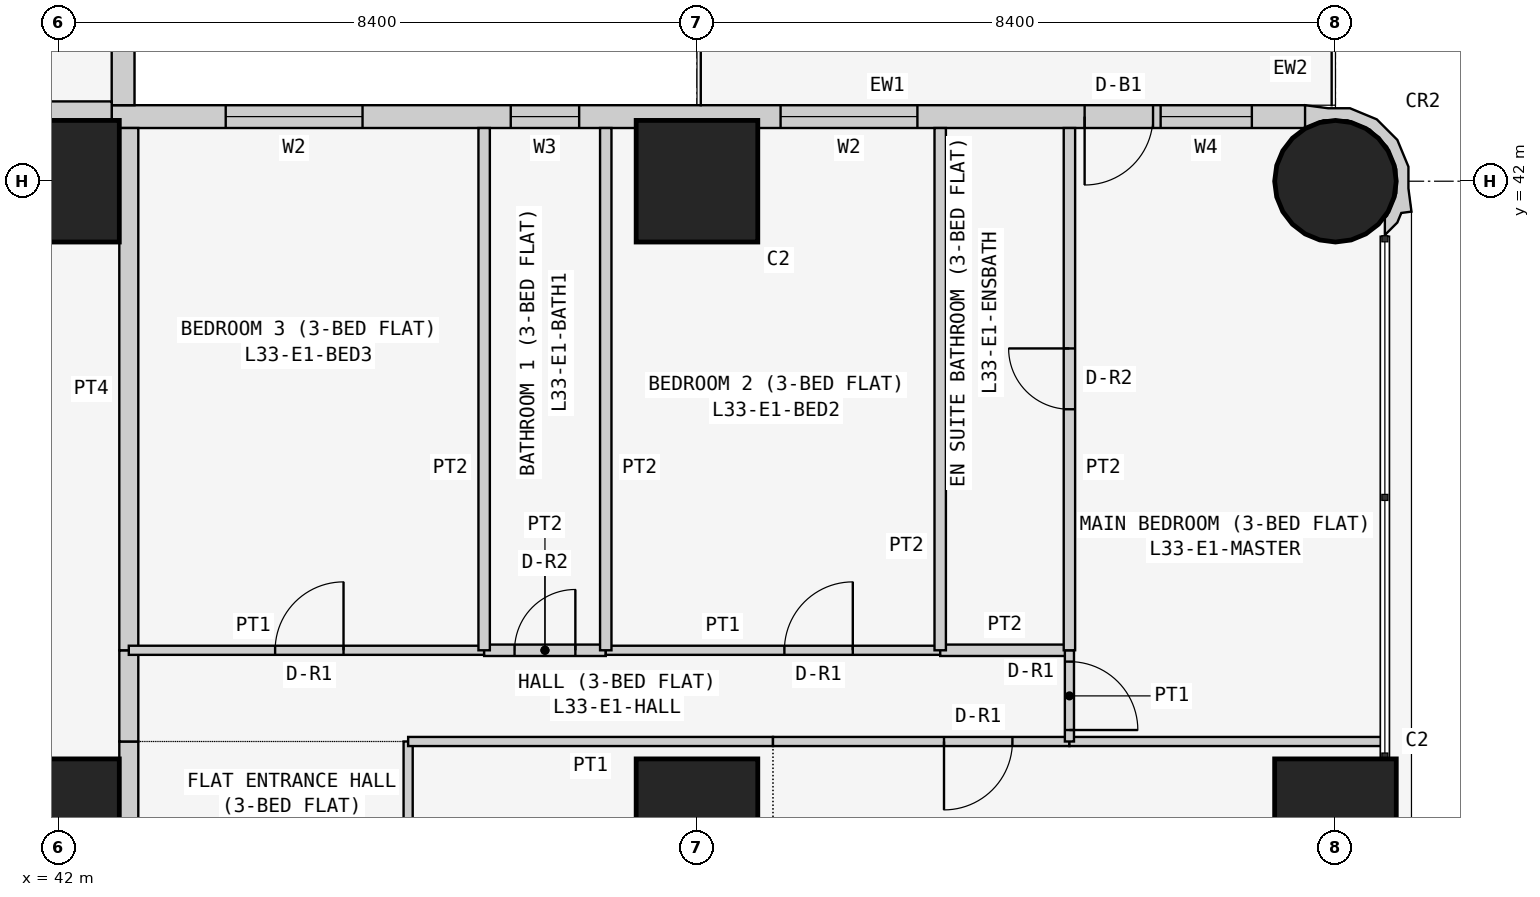
"""IFC4 building model, lengths in metres.
Left out: names, types, materials, properties, quantities, classifications, styles, units other than length and angle.
Written with IfcOpenShell. Run it as: python <this file> out.ifc"""

import sys

from ifc_helpers import new_model, si_unit, direction, frame, frame_2d, origin, origin_2d, place, context, subcontext, project, spatial, polyline, rectangle, circle, outline, extrude, element, fill, save


model = new_model("IFC4")
c1 = context("Model", 3, precision=1e-05, world=origin(), true_north=direction((0.0, 1.0)))
c2 = subcontext(c1, "Body", "Model", "MODEL_VIEW")
j1 = project(units=[si_unit("LENGTHUNIT", "METRE"), si_unit("PLANEANGLEUNIT", "RADIAN")], contexts=[c1])
p1 = place(None, origin())
s1 = spatial("IfcSite", under=j1, at=p1, CompositionType="ELEMENT")
p2 = place(p1, origin())
s2 = spatial("IfcBuilding", under=s1, at=p2, CompositionType="ELEMENT")
p3 = place(p2, frame((0.0, 0.0, 130.5)))
s3 = spatial("IfcBuildingStorey", under=s2, at=p3, CompositionType="ELEMENT", Elevation=130.5)
for number, where, z_axis, x_axis in (
    (1, (42.0, 33.6, 0.0), (0.0, 0.0, 1.0), (1.0, 0.0, 0.0)),
    (2, (42.0, 42.0, 0.0), (0.0, 0.0, 1.0), (1.0, 0.0, 0.0)),
    (3, (50.4, 33.6, 0.0), (0.0, 0.0, 1.0), (1.0, 0.0, 0.0)),
    (4, (50.4, 42.0, 0.0), (0.0, 0.0, 1.0), (1.0, 0.0, 0.0)),
    (5, (58.8, 33.6, 0.0), (0.0, 0.0, 1.0), (1.0, 0.0, 0.0)),
):
    element("IfcColumn", number, at=place(p3, frame(where, z_axis=z_axis, x_axis=x_axis)), inside=s3, PredefinedType="COLUMN", context=c2, shape_type="SweptSolid", body=[
        extrude(rectangle(XDim=1.6, YDim=1.6, at=origin_2d()), origin(), (0.0, 0.0, 1.0), 3.6),
    ])
p4 = place(p3, frame((58.8, 42.0, 0.0), z_axis=(0.0, 0.0, 1.0), x_axis=(1.0, 0.0, 0.0)))
e6 = element("IfcColumn", 6, at=p4, inside=s3, PredefinedType="COLUMN", context=c2, shape_type="SweptSolid", body=[
    extrude(circle(Radius=0.8, at=origin_2d()), origin(), (0.0, 0.0, 1.0), 3.6),
])
p5 = place(p3, frame((58.4, 42.85, 0.0), z_axis=(0.0, 0.0, 1.0), x_axis=(-1.0, 0.0, 0.0)))
e7 = element("IfcWall", 7, at=p5, inside=s3, PredefinedType="SOLIDWALL", context=c2, shape_type="SweptSolid", body=[
    extrude(rectangle(XDim=15.7, YDim=0.3, at=frame_2d((7.85, 0.0))), origin(), (0.0, 0.0, 1.0), 3.45),
])
p6 = place(p5, frame((12.4, 0.0, 0.9)))
e8 = element("IfcOpeningElement", 8, at=p6, cuts=e7, PredefinedType="OPENING", context=c2, shape_type="SweptSolid", body=[
    extrude(rectangle(XDim=1.8, YDim=1.5, at=frame_2d((0.9, 0.75))), frame((0.0, 0.16, 0.0), z_axis=(0.0, -1.0, 0.0), x_axis=(1.0, 0.0, 0.0)), (0.0, 0.0, 1.0), 0.32),
])
p7 = place(p5, frame((9.55, 0.0, 1.5)))
e9 = element("IfcOpeningElement", 9, at=p7, cuts=e7, PredefinedType="OPENING", context=c2, shape_type="SweptSolid", body=[
    extrude(rectangle(XDim=0.9, YDim=0.7, at=frame_2d((0.45, 0.35))), frame((0.0, 0.16, 0.0), z_axis=(0.0, -1.0, 0.0), x_axis=(1.0, 0.0, 0.0)), (0.0, 0.0, 1.0), 0.32),
])
p8 = place(p5, frame((5.1, 0.0, 0.9)))
e10 = element("IfcOpeningElement", 10, at=p8, cuts=e7, PredefinedType="OPENING", context=c2, shape_type="SweptSolid", body=[
    extrude(rectangle(XDim=1.8, YDim=1.5, at=frame_2d((0.9, 0.75))), frame((0.0, 0.16, 0.0), z_axis=(0.0, -1.0, 0.0), x_axis=(1.0, 0.0, 0.0)), (0.0, 0.0, 1.0), 0.32),
])
p9 = place(p5, frame((2.0, 0.0, 0.0)))
e11 = element("IfcOpeningElement", 11, at=p9, cuts=e7, PredefinedType="OPENING", context=c2, shape_type="SweptSolid", body=[
    extrude(rectangle(XDim=0.9, YDim=2.4, at=frame_2d((0.45, 1.2))), frame((0.0, 0.16, 0.0), z_axis=(0.0, -1.0, 0.0), x_axis=(1.0, 0.0, 0.0)), (0.0, 0.0, 1.0), 0.32),
])
p10 = place(p5, frame((0.7, 0.0, 0.9)))
e12 = element("IfcOpeningElement", 12, at=p10, cuts=e7, PredefinedType="OPENING", context=c2, shape_type="SweptSolid", body=[
    extrude(rectangle(XDim=1.2, YDim=1.5, at=frame_2d((0.6, 0.75))), frame((0.0, 0.16, 0.0), z_axis=(0.0, -1.0, 0.0), x_axis=(1.0, 0.0, 0.0)), (0.0, 0.0, 1.0), 0.32),
])
p11 = place(p3, frame((42.85, 43.0, 0.0), z_axis=(0.0, 0.0, 1.0), x_axis=(0.0, 1.0, 0.0)))
e13 = element("IfcWall", 13, at=p11, inside=s3, PredefinedType="SOLIDWALL", context=c2, shape_type="SweptSolid", body=[
    extrude(rectangle(XDim=7.0, YDim=0.3, at=frame_2d((3.5, 0.0))), origin(), (0.0, 0.0, 1.0), 3.45),
])
p12 = place(p11, frame((1.5, 0.0, 0.9)))
e14 = element("IfcOpeningElement", 14, at=p12, cuts=e13, PredefinedType="OPENING", context=c2, shape_type="SweptSolid", body=[
    extrude(rectangle(XDim=2.4, YDim=1.5, at=frame_2d((1.2, 0.75))), frame((0.0, 0.16, 0.0), z_axis=(0.0, -1.0, 0.0), x_axis=(1.0, 0.0, 0.0)), (0.0, 0.0, 1.0), 0.32),
])
p13 = place(p11, frame((5.05, 0.0, 0.9)))
e15 = element("IfcOpeningElement", 15, at=p13, cuts=e13, PredefinedType="OPENING", context=c2, shape_type="SweptSolid", body=[
    extrude(rectangle(XDim=1.2, YDim=1.5, at=frame_2d((0.6, 0.75))), frame((0.0, 0.16, 0.0), z_axis=(0.0, -1.0, 0.0), x_axis=(1.0, 0.0, 0.0)), (0.0, 0.0, 1.0), 0.32),
])
p14 = place(p3, frame((59.395, 41.352, 0.0), z_axis=(0.0, 0.0, 1.0), x_axis=(0.93923434088, 0.343276641956, 0.0)))
e16 = element("IfcWall", 16, at=p14, inside=s3, PredefinedType="SOLIDWALL", context=c2, shape_type="SweptSolid", body=[
    extrude(outline(polyline([(0.532, 0.393), (0.631, 0.663), (0.614, 1.044), (0.453, 1.391), (0.172, 1.649), (-0.097, 1.748), (-0.369, 1.89), (-0.509, 1.621), (-0.491, 1.615), (-0.479, 1.609), (-0.211, 1.62), (0.088, 1.511), (0.323, 1.295), (0.457, 1.006), (0.47, 0.688), (0.361, 0.389), (0.145, 0.154), (0.108, 0.136), (0.031, -0.075), (0.241, 0.023), (0.333, 0.124), (0.465, 0.094), (0.532, 0.393)])), origin(), (0.0, 0.0, 1.0), 3.45),
])
p15 = place(p3, frame((35.829, 42.925, 0.0), z_axis=(0.0, 0.0, 1.0), x_axis=(1.0, 0.0, 0.0)))
e17 = element("IfcWall", 17, at=p15, inside=s3, PredefinedType="PARTITIONING", context=c2, shape_type="SweptSolid", body=[
    extrude(rectangle(XDim=6.871, YDim=0.25, at=frame_2d((3.436, 0.0))), origin(), (0.0, 0.0, 1.0), 3.45),
])
p16 = place(p3, frame((42.925, 34.629, 0.0), z_axis=(0.0, 0.0, 1.0), x_axis=(0.0, -1.0, 0.0)))
e18 = element("IfcWall", 18, at=p16, inside=s3, PredefinedType="PARTITIONING", context=c2, shape_type="SweptSolid", body=[
    extrude(rectangle(XDim=5.229, YDim=0.25, at=frame_2d((2.615, 0.0))), origin(), (0.0, 0.0, 1.0), 3.45),
])
p17 = place(p16, frame((2.129, 0.0, 0.0)))
e19 = element("IfcOpeningElement", 19, at=p17, cuts=e18, PredefinedType="OPENING", context=c2, shape_type="SweptSolid", body=[
    extrude(rectangle(XDim=1.0, YDim=2.1, at=frame_2d((0.5, 1.05))), frame((0.0, 0.135, 0.0), z_axis=(0.0, -1.0, 0.0), x_axis=(1.0, 0.0, 0.0)), (0.0, 0.0, 1.0), 0.27),
])
p18 = place(p3, frame((42.925, 35.829, 0.0), z_axis=(0.0, 0.0, 1.0), x_axis=(0.0, -1.0, 0.0)))
e20 = element("IfcWall", 20, at=p18, inside=s3, PredefinedType="PARTITIONING", context=c2, shape_type="SweptSolid", body=[
    extrude(rectangle(XDim=1.2, YDim=0.25, at=frame_2d((0.6, 0.0))), origin(), (0.0, 0.0, 1.0), 3.45),
])
p19 = place(p3, frame((42.925, 42.7, 0.0), z_axis=(0.0, 0.0, 1.0), x_axis=(0.0, -1.0, 0.0)))
e21 = element("IfcWall", 21, at=p19, inside=s3, PredefinedType="PARTITIONING", context=c2, shape_type="SweptSolid", body=[
    extrude(rectangle(XDim=6.871, YDim=0.25, at=frame_2d((3.436, 0.0))), origin(), (0.0, 0.0, 1.0), 3.45),
])
p20 = place(p3, frame((46.6, 29.4, 0.0), z_axis=(0.0, 0.0, 1.0), x_axis=(0.0, 1.0, 0.0)))
e22 = element("IfcWall", 22, at=p20, inside=s3, PredefinedType="PARTITIONING", context=c2, shape_type="SweptSolid", body=[
    extrude(rectangle(XDim=5.229, YDim=0.12, at=frame_2d((2.615, 0.0))), origin(), (0.0, 0.0, 1.0), 3.45),
])
p21 = place(p20, frame((1.05, 0.0, 0.0)))
e23 = element("IfcOpeningElement", 23, at=p21, cuts=e22, PredefinedType="OPENING", context=c2, shape_type="SweptSolid", body=[
    extrude(rectangle(XDim=0.9, YDim=2.1, at=frame_2d((0.45, 1.05))), frame((0.0, 0.07, 0.0), z_axis=(0.0, -1.0, 0.0), x_axis=(1.0, 0.0, 0.0)), (0.0, 0.0, 1.0), 0.14),
])
p22 = place(p3, frame((51.4, 34.629, 0.0), z_axis=(0.0, 0.0, 1.0), x_axis=(-1.0, 0.0, 0.0)))
e24 = element("IfcWall", 24, at=p22, inside=s3, PredefinedType="PARTITIONING", context=c2, shape_type="SweptSolid", body=[
    extrude(rectangle(XDim=4.8, YDim=0.12, at=frame_2d((2.4, 0.0))), origin(), (0.0, 0.0, 1.0), 3.45),
])
p23 = place(p3, frame((55.3, 34.629, 0.0), z_axis=(0.0, 0.0, 1.0), x_axis=(-1.0, 0.0, 0.0)))
e25 = element("IfcWall", 25, at=p23, inside=s3, PredefinedType="PARTITIONING", context=c2, shape_type="SweptSolid", body=[
    extrude(rectangle(XDim=3.9, YDim=0.12, at=frame_2d((1.95, 0.0))), origin(), (0.0, 0.0, 1.0), 3.45),
])
p24 = place(p23, frame((0.75, 0.0, 0.0)))
e26 = element("IfcOpeningElement", 26, at=p24, cuts=e25, PredefinedType="OPENING", context=c2, shape_type="SweptSolid", body=[
    extrude(rectangle(XDim=0.9, YDim=2.1, at=frame_2d((0.45, 1.05))), frame((0.0, 0.07, 0.0), z_axis=(0.0, -1.0, 0.0), x_axis=(1.0, 0.0, 0.0)), (0.0, 0.0, 1.0), 0.14),
])
p25 = place(p3, frame((59.45, 34.629, 0.0), z_axis=(0.0, 0.0, 1.0), x_axis=(-1.0, 0.0, 0.0)))
e27 = element("IfcWall", 27, at=p25, inside=s3, PredefinedType="PARTITIONING", context=c2, shape_type="SweptSolid", body=[
    extrude(rectangle(XDim=4.15, YDim=0.12, at=frame_2d((2.075, 0.0))), origin(), (0.0, 0.0, 1.0), 3.45),
])
p26 = place(p3, frame((47.6, 35.829, 0.0), z_axis=(0.0, 0.0, 1.0), x_axis=(-1.0, 0.0, 0.0)))
e28 = element("IfcWall", 28, at=p26, inside=s3, PredefinedType="PARTITIONING", context=c2, shape_type="SweptSolid", body=[
    extrude(rectangle(XDim=4.675, YDim=0.12, at=frame_2d((2.337, 0.0))), origin(), (0.0, 0.0, 1.0), 3.45),
])
p27 = place(p26, frame((1.85, 0.0, 0.0)))
e29 = element("IfcOpeningElement", 29, at=p27, cuts=e28, PredefinedType="OPENING", context=c2, shape_type="SweptSolid", body=[
    extrude(rectangle(XDim=0.9, YDim=2.1, at=frame_2d((0.45, 1.05))), frame((0.0, 0.07, 0.0), z_axis=(0.0, -1.0, 0.0), x_axis=(1.0, 0.0, 0.0)), (0.0, 0.0, 1.0), 0.14),
])
p28 = place(p3, frame((49.2, 35.829, 0.0), z_axis=(0.0, 0.0, 1.0), x_axis=(-1.0, 0.0, 0.0)))
e30 = element("IfcWall", 30, at=p28, inside=s3, PredefinedType="PARTITIONING", context=c2, shape_type="SweptSolid", body=[
    extrude(rectangle(XDim=1.6, YDim=0.15, at=frame_2d((0.8, 0.0))), origin(), (0.0, 0.0, 1.0), 3.45),
])
p29 = place(p28, frame((0.4, 0.0, 0.0)))
e31 = element("IfcOpeningElement", 31, at=p29, cuts=e30, PredefinedType="OPENING", context=c2, shape_type="SweptSolid", body=[
    extrude(rectangle(XDim=0.8, YDim=2.1, at=frame_2d((0.4, 1.05))), frame((0.0, 0.085, 0.0), z_axis=(0.0, -1.0, 0.0), x_axis=(1.0, 0.0, 0.0)), (0.0, 0.0, 1.0), 0.17),
])
p30 = place(p3, frame((53.6, 35.829, 0.0), z_axis=(0.0, 0.0, 1.0), x_axis=(-1.0, 0.0, 0.0)))
e32 = element("IfcWall", 32, at=p30, inside=s3, PredefinedType="PARTITIONING", context=c2, shape_type="SweptSolid", body=[
    extrude(rectangle(XDim=4.4, YDim=0.12, at=frame_2d((2.2, 0.0))), origin(), (0.0, 0.0, 1.0), 3.45),
])
p31 = place(p30, frame((1.15, 0.0, 0.0)))
e33 = element("IfcOpeningElement", 33, at=p31, cuts=e32, PredefinedType="OPENING", context=c2, shape_type="SweptSolid", body=[
    extrude(rectangle(XDim=0.9, YDim=2.1, at=frame_2d((0.45, 1.05))), frame((0.0, 0.07, 0.0), z_axis=(0.0, -1.0, 0.0), x_axis=(1.0, 0.0, 0.0)), (0.0, 0.0, 1.0), 0.14),
])
p32 = place(p3, frame((55.3, 35.829, 0.0), z_axis=(0.0, 0.0, 1.0), x_axis=(-1.0, 0.0, 0.0)))
e34 = element("IfcWall", 34, at=p32, inside=s3, PredefinedType="PARTITIONING", context=c2, shape_type="SweptSolid", body=[
    extrude(rectangle(XDim=1.7, YDim=0.15, at=frame_2d((0.85, 0.0))), origin(), (0.0, 0.0, 1.0), 3.45),
])
p33 = place(p3, frame((55.3, 34.629, 0.0), z_axis=(0.0, 0.0, 1.0), x_axis=(0.0, 1.0, 0.0)))
e35 = element("IfcWall", 35, at=p33, inside=s3, PredefinedType="PARTITIONING", context=c2, shape_type="SweptSolid", body=[
    extrude(rectangle(XDim=1.2, YDim=0.12, at=frame_2d((0.6, 0.0))), origin(), (0.0, 0.0, 1.0), 3.45),
])
p34 = place(p33, frame((0.151, 0.0, 0.0)))
e36 = element("IfcOpeningElement", 36, at=p34, cuts=e35, PredefinedType="OPENING", context=c2, shape_type="SweptSolid", body=[
    extrude(rectangle(XDim=0.9, YDim=2.1, at=frame_2d((0.45, 1.05))), frame((0.0, 0.07, 0.0), z_axis=(0.0, -1.0, 0.0), x_axis=(1.0, 0.0, 0.0)), (0.0, 0.0, 1.0), 0.14),
])
for number, where, z_axis, x_axis in (
    (37, (47.6, 35.829, 0.0), (0.0, 0.0, 1.0), (0.0, 1.0, 0.0)),
    (38, (49.2, 35.829, 0.0), (0.0, 0.0, 1.0), (0.0, 1.0, 0.0)),
    (39, (53.6, 35.829, 0.0), (0.0, 0.0, 1.0), (0.0, 1.0, 0.0)),
):
    element("IfcWall", number, at=place(p3, frame(where, z_axis=z_axis, x_axis=x_axis)), inside=s3, PredefinedType="PARTITIONING", context=c2, shape_type="SweptSolid", body=[
        extrude(rectangle(XDim=6.871, YDim=0.15, at=frame_2d((3.436, 0.0))), origin(), (0.0, 0.0, 1.0), 3.45),
    ])
p35 = place(p3, frame((55.3, 35.829, 0.0), z_axis=(0.0, 0.0, 1.0), x_axis=(0.0, 1.0, 0.0)))
e40 = element("IfcWall", 40, at=p35, inside=s3, PredefinedType="PARTITIONING", context=c2, shape_type="SweptSolid", body=[
    extrude(rectangle(XDim=6.871, YDim=0.15, at=frame_2d((3.436, 0.0))), origin(), (0.0, 0.0, 1.0), 3.45),
])
p36 = place(p35, frame((3.171, 0.0, 0.0)))
e41 = element("IfcOpeningElement", 41, at=p36, cuts=e40, PredefinedType="OPENING", context=c2, shape_type="SweptSolid", body=[
    extrude(rectangle(XDim=0.8, YDim=2.1, at=frame_2d((0.4, 1.05))), frame((0.0, 0.085, 0.0), z_axis=(0.0, -1.0, 0.0), x_axis=(1.0, 0.0, 0.0)), (0.0, 0.0, 1.0), 0.17),
])
p37 = place(p6, origin())
e42 = element("IfcWindow", 42, at=p37, inside=s3, PartitioningType="SINGLE_PANEL", PredefinedType="WINDOW", context=c2, shape_type="SweptSolid", body=[
    extrude(rectangle(XDim=1.8, YDim=1.5, at=frame_2d((0.9, 0.75))), frame((0.0, 0.03, 0.0), z_axis=(0.0, -1.0, 0.0), x_axis=(1.0, 0.0, 0.0)), (0.0, 0.0, 1.0), 0.06),
])
fill(e8, e42)
p38 = place(p7, origin())
e43 = element("IfcWindow", 43, at=p38, inside=s3, PartitioningType="SINGLE_PANEL", PredefinedType="WINDOW", context=c2, shape_type="SweptSolid", body=[
    extrude(rectangle(XDim=0.9, YDim=0.7, at=frame_2d((0.45, 0.35))), frame((0.0, 0.03, 0.0), z_axis=(0.0, -1.0, 0.0), x_axis=(1.0, 0.0, 0.0)), (0.0, 0.0, 1.0), 0.06),
])
fill(e9, e43)
p39 = place(p8, origin())
e44 = element("IfcWindow", 44, at=p39, inside=s3, PartitioningType="SINGLE_PANEL", PredefinedType="WINDOW", context=c2, shape_type="SweptSolid", body=[
    extrude(rectangle(XDim=1.8, YDim=1.5, at=frame_2d((0.9, 0.75))), frame((0.0, 0.03, 0.0), z_axis=(0.0, -1.0, 0.0), x_axis=(1.0, 0.0, 0.0)), (0.0, 0.0, 1.0), 0.06),
])
fill(e10, e44)
p40 = place(p9, origin())
e45 = element("IfcDoor", 45, at=p40, inside=s3, OperationType="SINGLE_SWING_RIGHT", PredefinedType="DOOR", context=c2, shape_type="SweptSolid", body=[
    extrude(rectangle(XDim=0.9, YDim=2.4, at=frame_2d((0.45, 1.2))), frame((0.0, 0.025, 0.0), z_axis=(0.0, -1.0, 0.0), x_axis=(1.0, 0.0, 0.0)), (0.0, 0.0, 1.0), 0.05),
])
fill(e11, e45)
p41 = place(p10, origin())
e46 = element("IfcWindow", 46, at=p41, inside=s3, PartitioningType="SINGLE_PANEL", PredefinedType="WINDOW", context=c2, shape_type="SweptSolid", body=[
    extrude(rectangle(XDim=1.2, YDim=1.5, at=frame_2d((0.6, 0.75))), frame((0.0, 0.03, 0.0), z_axis=(0.0, -1.0, 0.0), x_axis=(1.0, 0.0, 0.0)), (0.0, 0.0, 1.0), 0.06),
])
fill(e12, e46)
p42 = place(p24, origin())
e47 = element("IfcDoor", 47, at=p42, inside=s3, OperationType="SINGLE_SWING_RIGHT", PredefinedType="DOOR", context=c2, shape_type="SweptSolid", body=[
    extrude(rectangle(XDim=0.9, YDim=2.1, at=frame_2d((0.45, 1.05))), frame((0.0, 0.025, 0.0), z_axis=(0.0, -1.0, 0.0), x_axis=(1.0, 0.0, 0.0)), (0.0, 0.0, 1.0), 0.05),
])
fill(e26, e47)
p43 = place(p27, frame((0.9, 0.0, 0.0), z_axis=(0.0, 0.0, 1.0), x_axis=(-1.0, 0.0, 0.0)))
e48 = element("IfcDoor", 48, at=p43, inside=s3, OperationType="SINGLE_SWING_RIGHT", PredefinedType="DOOR", context=c2, shape_type="SweptSolid", body=[
    extrude(rectangle(XDim=0.9, YDim=2.1, at=frame_2d((0.45, 1.05))), frame((0.0, 0.025, 0.0), z_axis=(0.0, -1.0, 0.0), x_axis=(1.0, 0.0, 0.0)), (0.0, 0.0, 1.0), 0.05),
])
fill(e29, e48)
p44 = place(p29, frame((0.8, 0.0, 0.0), z_axis=(0.0, 0.0, 1.0), x_axis=(-1.0, 0.0, 0.0)))
e49 = element("IfcDoor", 49, at=p44, inside=s3, OperationType="SINGLE_SWING_RIGHT", PredefinedType="DOOR", context=c2, shape_type="SweptSolid", body=[
    extrude(rectangle(XDim=0.8, YDim=2.1, at=frame_2d((0.4, 1.05))), frame((0.0, 0.025, 0.0), z_axis=(0.0, -1.0, 0.0), x_axis=(1.0, 0.0, 0.0)), (0.0, 0.0, 1.0), 0.05),
])
fill(e31, e49)
p45 = place(p31, frame((0.9, 0.0, 0.0), z_axis=(0.0, 0.0, 1.0), x_axis=(-1.0, 0.0, 0.0)))
e50 = element("IfcDoor", 50, at=p45, inside=s3, OperationType="SINGLE_SWING_RIGHT", PredefinedType="DOOR", context=c2, shape_type="SweptSolid", body=[
    extrude(rectangle(XDim=0.9, YDim=2.1, at=frame_2d((0.45, 1.05))), frame((0.0, 0.025, 0.0), z_axis=(0.0, -1.0, 0.0), x_axis=(1.0, 0.0, 0.0)), (0.0, 0.0, 1.0), 0.05),
])
fill(e33, e50)
p46 = place(p34, frame((0.9, 0.0, 0.0), z_axis=(0.0, 0.0, 1.0), x_axis=(-1.0, 0.0, 0.0)))
e51 = element("IfcDoor", 51, at=p46, inside=s3, OperationType="SINGLE_SWING_RIGHT", PredefinedType="DOOR", context=c2, shape_type="SweptSolid", body=[
    extrude(rectangle(XDim=0.9, YDim=2.1, at=frame_2d((0.45, 1.05))), frame((0.0, 0.025, 0.0), z_axis=(0.0, -1.0, 0.0), x_axis=(1.0, 0.0, 0.0)), (0.0, 0.0, 1.0), 0.05),
])
fill(e36, e51)
p47 = place(p36, origin())
e52 = element("IfcDoor", 52, at=p47, inside=s3, OperationType="SINGLE_SWING_RIGHT", PredefinedType="DOOR", context=c2, shape_type="SweptSolid", body=[
    extrude(rectangle(XDim=0.8, YDim=2.1, at=frame_2d((0.4, 1.05))), frame((0.0, 0.025, 0.0), z_axis=(0.0, -1.0, 0.0), x_axis=(1.0, 0.0, 0.0)), (0.0, 0.0, 1.0), 0.05),
])
fill(e41, e52)
save(model, sys.argv[1])
